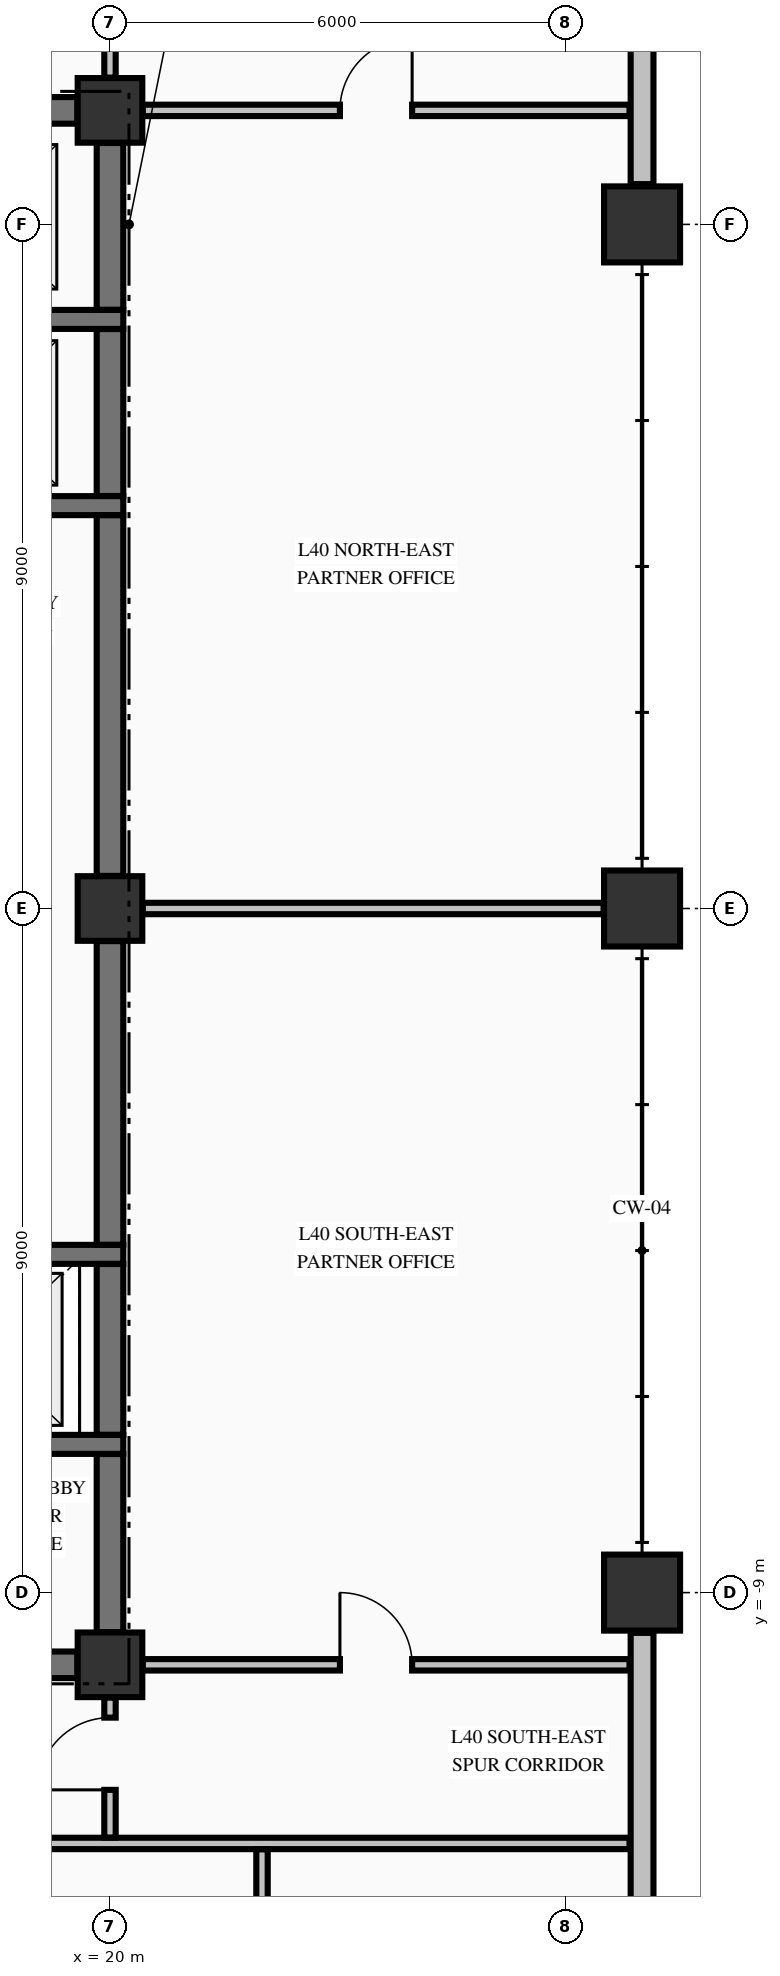
"""IFC4 building model, lengths in metres.
Left out: names, types, materials, properties, quantities, classifications, styles, units other than length and angle.
Written with IfcOpenShell. Run it as: python <this file> out.ifc"""

import sys

from ifc_helpers import new_model, si_unit, direction, frame, frame_2d, origin, origin_2d, place, context, subcontext, project, spatial, rectangle, extrude, element, fill, save


model = new_model("IFC4")
c1 = context("Model", 3, precision=1e-05, world=origin(), true_north=direction((0.0, 1.0)))
c2 = subcontext(c1, "Body", "Model", "MODEL_VIEW")
j1 = project(units=[si_unit("LENGTHUNIT", "METRE"), si_unit("PLANEANGLEUNIT", "RADIAN")], contexts=[c1])
p1 = place(None, origin())
s1 = spatial("IfcSite", under=j1, at=p1, CompositionType="ELEMENT")
p2 = place(p1, origin())
s2 = spatial("IfcBuilding", under=s1, at=p2, CompositionType="ELEMENT")
p3 = place(p2, frame((0.0, 0.0, 158.24)))
s3 = spatial("IfcBuildingStorey", under=s2, at=p3, CompositionType="ELEMENT", Elevation=158.24)
for number, where, z_axis, x_axis in (
    (1, (27.0, -9.0, -0.425), (0.0, 0.0, 1.0), (1.0, 0.0, 0.0)),
    (2, (27.0, 0.0, -0.425), (0.0, 0.0, 1.0), (1.0, 0.0, 0.0)),
    (3, (27.0, 9.0, -0.425), (0.0, 0.0, 1.0), (1.0, 0.0, 0.0)),
):
    element("IfcColumn", number, at=place(p3, frame(where, z_axis=z_axis, x_axis=x_axis)), inside=s3, PredefinedType="COLUMN", context=c2, shape_type="SweptSolid", body=[
        extrude(rectangle(XDim=1.0, YDim=1.0, at=origin_2d()), origin(), (0.0, 0.0, 1.0), 4.595),
    ])
for number, where, z_axis, x_axis in (
    (4, (20.0, -9.95, -0.425), (0.0, 0.0, 1.0), (1.0, 0.0, 0.0)),
    (5, (20.0, 10.5, -0.425), (0.0, 0.0, 1.0), (1.0, 0.0, 0.0)),
    (6, (20.0, 0.0, -0.425), (0.0, 0.0, 1.0), (1.0, 0.0, 0.0)),
):
    element("IfcColumn", number, at=place(p3, frame(where, z_axis=z_axis, x_axis=x_axis)), inside=s3, PredefinedType="COLUMN", context=c2, shape_type="SweptSolid", body=[
        extrude(rectangle(XDim=0.85, YDim=0.85, at=origin_2d()), origin(), (0.0, 0.0, 1.0), 4.595),
    ])
for number, where, z_axis, x_axis in (
    (7, (27.0, -18.97, 0.0), (0.0, 0.0, 1.0), (0.0, 1.0, 0.0)),
    (8, (27.0, 9.53, 0.0), (0.0, 0.0, 1.0), (0.0, 1.0, 0.0)),
):
    element("IfcWall", number, at=place(p3, frame(where, z_axis=z_axis, x_axis=x_axis)), inside=s3, PredefinedType="STANDARD", context=c2, shape_type="SweptSolid", body=[
        extrude(rectangle(XDim=9.44, YDim=0.3, at=frame_2d((4.72, 0.0))), origin(), (0.0, 0.0, 1.0), 1.962),
    ])
p4 = place(p3, frame((14.7, -9.95, 0.0), z_axis=(0.0, 0.0, 1.0), x_axis=(1.0, 0.0, 0.0)))
e9 = element("IfcWall", 9, at=p4, inside=s3, PredefinedType="SHEAR", context=c2, shape_type="SweptSolid", body=[
    extrude(rectangle(XDim=4.871, YDim=0.35, at=frame_2d((2.436, 0.0))), origin(), (0.0, 0.0, 1.0), 4.17),
])
p5 = place(p4, frame((0.65, 0.0, 0.0)))
e10 = element("IfcOpeningElement", 10, at=p5, cuts=e9, PredefinedType="OPENING", context=c2, shape_type="SweptSolid", body=[
    extrude(rectangle(XDim=1.2, YDim=2.15, at=frame_2d((0.6, 1.075))), frame((0.0, 0.185, 0.0), z_axis=(0.0, -1.0, 0.0), x_axis=(1.0, 0.0, 0.0)), (0.0, 0.0, 1.0), 0.37),
])
p6 = place(p4, frame((3.25, 0.0, 0.0)))
e11 = element("IfcOpeningElement", 11, at=p6, cuts=e9, PredefinedType="OPENING", context=c2, shape_type="SweptSolid", body=[
    extrude(rectangle(XDim=0.9, YDim=2.15, at=frame_2d((0.45, 1.075))), frame((0.0, 0.185, 0.0), z_axis=(0.0, -1.0, 0.0), x_axis=(1.0, 0.0, 0.0)), (0.0, 0.0, 1.0), 0.37),
])
for number, where, z_axis, x_axis in (
    (12, (17.025, -7.05, 0.0), (0.0, 0.0, 1.0), (1.0, 0.0, 0.0)),
    (13, (17.025, -4.55, 0.0), (0.0, 0.0, 1.0), (1.0, 0.0, 0.0)),
    (14, (17.025, 5.3, 0.0), (0.0, 0.0, 1.0), (1.0, 0.0, 0.0)),
    (15, (17.025, 7.75, 0.0), (0.0, 0.0, 1.0), (1.0, 0.0, 0.0)),
):
    element("IfcWall", number, at=place(p3, frame(where, z_axis=z_axis, x_axis=x_axis)), inside=s3, PredefinedType="SOLIDWALL", context=c2, shape_type="SweptSolid", body=[
        extrude(rectangle(XDim=3.15, YDim=0.25, at=frame_2d((1.575, 0.0))), origin(), (0.0, 0.0, 1.0), 4.17),
    ])
p7 = place(p3, frame((14.7, 10.5, 0.0), z_axis=(0.0, 0.0, 1.0), x_axis=(1.0, 0.0, 0.0)))
e16 = element("IfcWall", 16, at=p7, inside=s3, PredefinedType="SHEAR", context=c2, shape_type="SweptSolid", body=[
    extrude(rectangle(XDim=4.871, YDim=0.35, at=frame_2d((2.436, 0.0))), origin(), (0.0, 0.0, 1.0), 4.17),
])
p8 = place(p7, frame((0.65, 0.0, 0.0)))
e17 = element("IfcOpeningElement", 17, at=p8, cuts=e16, PredefinedType="OPENING", context=c2, shape_type="SweptSolid", body=[
    extrude(rectangle(XDim=1.2, YDim=2.15, at=frame_2d((0.6, 1.075))), frame((0.0, 0.185, 0.0), z_axis=(0.0, -1.0, 0.0), x_axis=(1.0, 0.0, 0.0)), (0.0, 0.0, 1.0), 0.37),
])
p9 = place(p3, frame((-20.075, -12.3, 0.0), z_axis=(0.0, 0.0, 1.0), x_axis=(1.0, 0.0, 0.0)))
e18 = element("IfcWall", 18, at=p9, inside=s3, PredefinedType="PARTITIONING", context=c2, shape_type="SweptSolid", body=[
    extrude(rectangle(XDim=46.91, YDim=0.15, at=frame_2d((23.455, 0.0))), origin(), (0.0, 0.0, 1.0), 4.17),
])
p10 = place(p9, frame((12.0, 0.0, 0.0)))
e19 = element("IfcOpeningElement", 19, at=p10, cuts=e18, PredefinedType="OPENING", context=c2, shape_type="SweptSolid", body=[
    extrude(rectangle(XDim=1.05, YDim=2.15, at=frame_2d((0.525, 1.075))), frame((0.0, 0.085, 0.0), z_axis=(0.0, -1.0, 0.0), x_axis=(1.0, 0.0, 0.0)), (0.0, 0.0, 1.0), 0.17),
])
p11 = place(p9, frame((16.4, 0.0, 0.0)))
e20 = element("IfcOpeningElement", 20, at=p11, cuts=e18, PredefinedType="OPENING", context=c2, shape_type="SweptSolid", body=[
    extrude(rectangle(XDim=0.95, YDim=2.15, at=frame_2d((0.475, 1.075))), frame((0.0, 0.085, 0.0), z_axis=(0.0, -1.0, 0.0), x_axis=(1.0, 0.0, 0.0)), (0.0, 0.0, 1.0), 0.17),
])
p12 = place(p9, frame((22.3, 0.0, 0.0)))
e21 = element("IfcOpeningElement", 21, at=p12, cuts=e18, PredefinedType="OPENING", context=c2, shape_type="SweptSolid", body=[
    extrude(rectangle(XDim=0.95, YDim=2.15, at=frame_2d((0.475, 1.075))), frame((0.0, 0.085, 0.0), z_axis=(0.0, -1.0, 0.0), x_axis=(1.0, 0.0, 0.0)), (0.0, 0.0, 1.0), 0.17),
])
p13 = place(p9, frame((33.0, 0.0, 0.0)))
e22 = element("IfcOpeningElement", 22, at=p13, cuts=e18, PredefinedType="OPENING", context=c2, shape_type="SweptSolid", body=[
    extrude(rectangle(XDim=1.05, YDim=2.15, at=frame_2d((0.525, 1.075))), frame((0.0, 0.085, 0.0), z_axis=(0.0, -1.0, 0.0), x_axis=(1.0, 0.0, 0.0)), (0.0, 0.0, 1.0), 0.17),
])
p14 = place(p9, frame((37.05, 0.0, 0.0)))
e23 = element("IfcOpeningElement", 23, at=p14, cuts=e18, PredefinedType="OPENING", context=c2, shape_type="SweptSolid", body=[
    extrude(rectangle(XDim=0.95, YDim=2.15, at=frame_2d((0.475, 1.075))), frame((0.0, 0.085, 0.0), z_axis=(0.0, -1.0, 0.0), x_axis=(1.0, 0.0, 0.0)), (0.0, 0.0, 1.0), 0.17),
])
p15 = place(p3, frame((20.431, -9.95, 0.0), z_axis=(0.0, 0.0, 1.0), x_axis=(1.0, 0.0, 0.0)))
e24 = element("IfcWall", 24, at=p15, inside=s3, PredefinedType="PARTITIONING", context=c2, shape_type="SweptSolid", body=[
    extrude(rectangle(XDim=6.404, YDim=0.15, at=frame_2d((3.202, 0.0))), origin(), (0.0, 0.0, 1.0), 4.17),
])
p16 = place(p15, frame((2.594, 0.0, 0.0)))
e25 = element("IfcOpeningElement", 25, at=p16, cuts=e24, PredefinedType="OPENING", context=c2, shape_type="SweptSolid", body=[
    extrude(rectangle(XDim=0.95, YDim=2.15, at=frame_2d((0.475, 1.075))), frame((0.0, 0.085, 0.0), z_axis=(0.0, -1.0, 0.0), x_axis=(1.0, 0.0, 0.0)), (0.0, 0.0, 1.0), 0.17),
])
p17 = place(p3, frame((20.431, 0.0, 0.0), z_axis=(0.0, 0.0, 1.0), x_axis=(1.0, 0.0, 0.0)))
e26 = element("IfcWall", 26, at=p17, inside=s3, PredefinedType="PARTITIONING", context=c2, shape_type="SweptSolid", body=[
    extrude(rectangle(XDim=6.063, YDim=0.15, at=frame_2d((3.031, 0.0))), origin(), (0.0, 0.0, 1.0), 2.362),
])
p18 = place(p3, frame((20.431, 10.5, 0.0), z_axis=(0.0, 0.0, 1.0), x_axis=(1.0, 0.0, 0.0)))
e27 = element("IfcWall", 27, at=p18, inside=s3, PredefinedType="PARTITIONING", context=c2, shape_type="SweptSolid", body=[
    extrude(rectangle(XDim=6.404, YDim=0.15, at=frame_2d((3.202, 0.0))), origin(), (0.0, 0.0, 1.0), 4.17),
])
p19 = place(p18, frame((2.594, 0.0, 0.0)))
e28 = element("IfcOpeningElement", 28, at=p19, cuts=e27, PredefinedType="OPENING", context=c2, shape_type="SweptSolid", body=[
    extrude(rectangle(XDim=0.95, YDim=2.15, at=frame_2d((0.475, 1.075))), frame((0.0, 0.085, 0.0), z_axis=(0.0, -1.0, 0.0), x_axis=(1.0, 0.0, 0.0)), (0.0, 0.0, 1.0), 0.17),
])
p20 = place(p3, frame((20.0, -9.521, 0.0), z_axis=(0.0, 0.0, 1.0), x_axis=(0.0, 1.0, 0.0)))
e29 = element("IfcWall", 29, at=p20, inside=s3, PredefinedType="SHEAR", context=c2, shape_type="SweptSolid", body=[
    extrude(rectangle(XDim=2.344, YDim=0.35, at=frame_2d((1.172, 0.0))), origin(), (0.0, 0.0, 1.0), 4.17),
])
p21 = place(p3, frame((20.0, -6.923, 0.0), z_axis=(0.0, 0.0, 1.0), x_axis=(0.0, 1.0, 0.0)))
e30 = element("IfcWall", 30, at=p21, inside=s3, PredefinedType="SHEAR", context=c2, shape_type="SweptSolid", body=[
    extrude(rectangle(XDim=2.246, YDim=0.35, at=frame_2d((1.123, 0.0))), origin(), (0.0, 0.0, 1.0), 4.17),
])
p22 = place(p3, frame((20.0, -4.423, 0.0), z_axis=(0.0, 0.0, 1.0), x_axis=(0.0, 1.0, 0.0)))
e31 = element("IfcWall", 31, at=p22, inside=s3, PredefinedType="SHEAR", context=c2, shape_type="SweptSolid", body=[
    extrude(rectangle(XDim=3.994, YDim=0.35, at=frame_2d((1.997, 0.0))), origin(), (0.0, 0.0, 1.0), 4.17),
])
p23 = place(p3, frame((20.0, 0.429, 0.0), z_axis=(0.0, 0.0, 1.0), x_axis=(0.0, 1.0, 0.0)))
e32 = element("IfcWall", 32, at=p23, inside=s3, PredefinedType="SHEAR", context=c2, shape_type="SweptSolid", body=[
    extrude(rectangle(XDim=4.744, YDim=0.35, at=frame_2d((2.372, 0.0))), origin(), (0.0, 0.0, 1.0), 4.17),
])
p24 = place(p3, frame((20.0, 5.427, 0.0), z_axis=(0.0, 0.0, 1.0), x_axis=(0.0, 1.0, 0.0)))
e33 = element("IfcWall", 33, at=p24, inside=s3, PredefinedType="SHEAR", context=c2, shape_type="SweptSolid", body=[
    extrude(rectangle(XDim=2.196, YDim=0.35, at=frame_2d((1.098, 0.0))), origin(), (0.0, 0.0, 1.0), 4.17),
])
p25 = place(p3, frame((20.0, 7.877, 0.0), z_axis=(0.0, 0.0, 1.0), x_axis=(0.0, 1.0, 0.0)))
e34 = element("IfcWall", 34, at=p25, inside=s3, PredefinedType="SHEAR", context=c2, shape_type="SweptSolid", body=[
    extrude(rectangle(XDim=2.194, YDim=0.35, at=frame_2d((1.097, 0.0))), origin(), (0.0, 0.0, 1.0), 4.17),
])
p26 = place(p3, frame((20.0, -12.222, 0.0), z_axis=(0.0, 0.0, 1.0), x_axis=(0.0, 1.0, 0.0)))
e35 = element("IfcWall", 35, at=p26, inside=s3, PredefinedType="PARTITIONING", context=c2, shape_type="SweptSolid", body=[
    extrude(rectangle(XDim=1.841, YDim=0.15, at=frame_2d((0.92, 0.0))), origin(), (0.0, 0.0, 1.0), 3.36),
])
p27 = place(p26, frame((0.627, 0.0, 0.0)))
e36 = element("IfcOpeningElement", 36, at=p27, cuts=e35, PredefinedType="OPENING", context=c2, shape_type="SweptSolid", body=[
    extrude(rectangle(XDim=0.95, YDim=2.15, at=frame_2d((0.475, 1.075))), frame((0.0, 0.085, 0.0), z_axis=(0.0, -1.0, 0.0), x_axis=(1.0, 0.0, 0.0)), (0.0, 0.0, 1.0), 0.17),
])
p28 = place(p3, frame((20.0, 10.931, 0.0), z_axis=(0.0, 0.0, 1.0), x_axis=(0.0, 1.0, 0.0)))
e37 = element("IfcWall", 37, at=p28, inside=s3, PredefinedType="PARTITIONING", context=c2, shape_type="SweptSolid", body=[
    extrude(rectangle(XDim=2.141, YDim=0.15, at=frame_2d((1.071, 0.0))), origin(), (0.0, 0.0, 1.0), 3.36),
])
p29 = place(p28, frame((0.414, 0.0, 0.0)))
e38 = element("IfcOpeningElement", 38, at=p29, cuts=e37, PredefinedType="OPENING", context=c2, shape_type="SweptSolid", body=[
    extrude(rectangle(XDim=0.95, YDim=2.15, at=frame_2d((0.475, 1.075))), frame((0.0, 0.085, 0.0), z_axis=(0.0, -1.0, 0.0), x_axis=(1.0, 0.0, 0.0)), (0.0, 0.0, 1.0), 0.17),
])
p30 = place(p3, frame((22.0, -18.994, 0.0), z_axis=(0.0, 0.0, 1.0), x_axis=(0.0, 1.0, 0.0)))
e39 = element("IfcWall", 39, at=p30, inside=s3, PredefinedType="PARTITIONING", context=c2, shape_type="SweptSolid", body=[
    extrude(rectangle(XDim=6.616, YDim=0.15, at=frame_2d((3.308, 0.0))), origin(), (0.0, 0.0, 1.0), 4.17),
])
p31 = place(p27, origin())
e40 = element("IfcDoor", 40, at=p31, inside=s3, OperationType="SINGLE_SWING_LEFT", PredefinedType="DOOR", context=c2, shape_type="SweptSolid", body=[
    extrude(rectangle(XDim=0.95, YDim=2.15, at=frame_2d((0.475, 1.075))), frame((0.0, 0.025, 0.0), z_axis=(0.0, -1.0, 0.0), x_axis=(1.0, 0.0, 0.0)), (0.0, 0.0, 1.0), 0.05),
])
fill(e36, e40)
p32 = place(p19, origin())
e41 = element("IfcDoor", 41, at=p32, inside=s3, OperationType="SINGLE_SWING_RIGHT", PredefinedType="DOOR", context=c2, shape_type="SweptSolid", body=[
    extrude(rectangle(XDim=0.95, YDim=2.15, at=frame_2d((0.475, 1.075))), frame((0.0, 0.025, 0.0), z_axis=(0.0, -1.0, 0.0), x_axis=(1.0, 0.0, 0.0)), (0.0, 0.0, 1.0), 0.05),
])
fill(e28, e41)
p33 = place(p16, origin())
e42 = element("IfcDoor", 42, at=p33, inside=s3, OperationType="SINGLE_SWING_LEFT", PredefinedType="DOOR", context=c2, shape_type="SweptSolid", body=[
    extrude(rectangle(XDim=0.95, YDim=2.15, at=frame_2d((0.475, 1.075))), frame((0.0, 0.025, 0.0), z_axis=(0.0, -1.0, 0.0), x_axis=(1.0, 0.0, 0.0)), (0.0, 0.0, 1.0), 0.05),
])
fill(e25, e42)
save(model, sys.argv[1])
